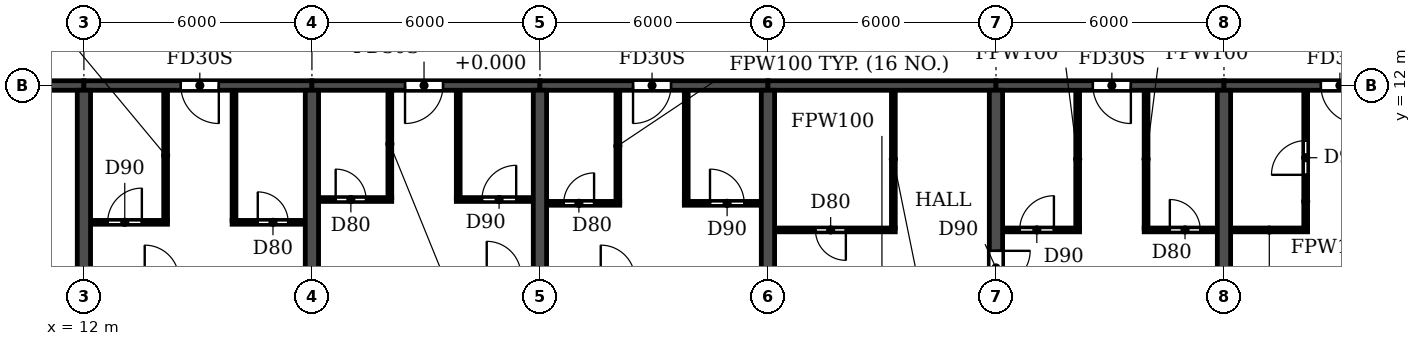
"""IFC4 building model, lengths in metres.
Left out: names, types, materials, properties, quantities, classifications, styles, units other than length and angle.
Written with IfcOpenShell. Run it as: python <this file> out.ifc"""

import sys

from ifc_helpers import new_model, si_unit, direction, frame, frame_2d, origin, place, context, subcontext, project, spatial, rectangle, extrude, element, fill, save


model = new_model("IFC4")
c1 = context("Model", 3, precision=1e-05, world=origin(), true_north=direction((0.0, 1.0)))
c2 = subcontext(c1, "Body", "Model", "MODEL_VIEW")
j1 = project(units=[si_unit("LENGTHUNIT", "METRE"), si_unit("PLANEANGLEUNIT", "RADIAN")], contexts=[c1])
p1 = place(None, origin())
s1 = spatial("IfcSite", under=j1, at=p1, CompositionType="ELEMENT")
p2 = place(p1, origin())
s2 = spatial("IfcBuilding", under=s1, at=p2, CompositionType="ELEMENT")
p3 = place(p2, frame((0.0, 0.0, 76.2)))
s3 = spatial("IfcBuildingStorey", under=s2, at=p3, CompositionType="ELEMENT", Elevation=76.2)
for number, where, z_axis, x_axis in (
    (1, (12.0, 0.2, 0.0), (0.0, 0.0, 1.0), (0.0, 1.0, 0.0)),
    (2, (18.0, 0.2, 0.0), (0.0, 0.0, 1.0), (0.0, 1.0, 0.0)),
    (3, (24.0, 0.2, 0.0), (0.0, 0.0, 1.0), (0.0, 1.0, 0.0)),
    (4, (30.0, 0.2, 0.0), (0.0, 0.0, 1.0), (0.0, 1.0, 0.0)),
):
    element("IfcWall", number, at=place(p3, frame(where, z_axis=z_axis, x_axis=x_axis)), inside=s3, PredefinedType="SHEAR", context=c2, shape_type="SweptSolid", body=[
        extrude(rectangle(XDim=11.675, YDim=0.35, at=frame_2d((5.837, 0.0))), origin(), (0.0, 0.0, 1.0), 3.06),
    ])
p4 = place(p3, frame((36.0, 0.2, 0.0), z_axis=(0.0, 0.0, 1.0), x_axis=(0.0, 1.0, 0.0)))
e5 = element("IfcWall", 5, at=p4, inside=s3, PredefinedType="SHEAR", context=c2, shape_type="SweptSolid", body=[
    extrude(rectangle(XDim=11.675, YDim=0.35, at=frame_2d((5.837, 0.0))), origin(), (0.0, 0.0, 1.0), 3.06),
])
p5 = place(p4, frame((6.55, 0.0, 0.0)))
e6 = element("IfcOpeningElement", 6, at=p5, cuts=e5, PredefinedType="OPENING", context=c2, shape_type="SweptSolid", body=[
    extrude(rectangle(XDim=0.9, YDim=2.1, at=frame_2d((0.45, 1.05))), frame((0.0, 0.185, 0.0), z_axis=(0.0, -1.0, 0.0), x_axis=(1.0, 0.0, 0.0)), (0.0, 0.0, 1.0), 0.37),
])
p6 = place(p3, frame((42.0, 0.2, 0.0), z_axis=(0.0, 0.0, 1.0), x_axis=(0.0, 1.0, 0.0)))
e7 = element("IfcWall", 7, at=p6, inside=s3, PredefinedType="SHEAR", context=c2, shape_type="SweptSolid", body=[
    extrude(rectangle(XDim=11.675, YDim=0.35, at=frame_2d((5.837, 0.0))), origin(), (0.0, 0.0, 1.0), 3.06),
])
p7 = place(p3, frame((6.2, 12.0, 0.0), z_axis=(0.0, 0.0, 1.0), x_axis=(1.0, 0.0, 0.0)))
e8 = element("IfcWall", 8, at=p7, inside=s3, PredefinedType="SHEAR", context=c2, shape_type="SweptSolid", body=[
    extrude(rectangle(XDim=5.8, YDim=0.25, at=frame_2d((2.9, 0.0))), origin(), (0.0, 0.0, 1.0), 2.46),
])
p8 = place(p7, frame((2.3, 0.0, 0.0)))
e9 = element("IfcOpeningElement", 9, at=p8, cuts=e8, PredefinedType="OPENING", context=c2, shape_type="SweptSolid", body=[
    extrude(rectangle(XDim=1.0, YDim=2.1, at=frame_2d((0.5, 1.05))), frame((0.0, 0.135, 0.0), z_axis=(0.0, -1.0, 0.0), x_axis=(1.0, 0.0, 0.0)), (0.0, 0.0, 1.0), 0.27),
])
p9 = place(p3, frame((12.0, 12.0, 0.0), z_axis=(0.0, 0.0, 1.0), x_axis=(1.0, 0.0, 0.0)))
e10 = element("IfcWall", 10, at=p9, inside=s3, PredefinedType="SHEAR", context=c2, shape_type="SweptSolid", body=[
    extrude(rectangle(XDim=6.0, YDim=0.25, at=frame_2d((3.0, 0.0))), origin(), (0.0, 0.0, 1.0), 2.46),
])
p10 = place(p9, frame((2.55, 0.0, 0.0)))
e11 = element("IfcOpeningElement", 11, at=p10, cuts=e10, PredefinedType="OPENING", context=c2, shape_type="SweptSolid", body=[
    extrude(rectangle(XDim=1.0, YDim=2.1, at=frame_2d((0.5, 1.05))), frame((0.0, 0.135, 0.0), z_axis=(0.0, -1.0, 0.0), x_axis=(1.0, 0.0, 0.0)), (0.0, 0.0, 1.0), 0.27),
])
p11 = place(p3, frame((18.0, 12.0, 0.0), z_axis=(0.0, 0.0, 1.0), x_axis=(1.0, 0.0, 0.0)))
e12 = element("IfcWall", 12, at=p11, inside=s3, PredefinedType="SHEAR", context=c2, shape_type="SweptSolid", body=[
    extrude(rectangle(XDim=6.0, YDim=0.25, at=frame_2d((3.0, 0.0))), origin(), (0.0, 0.0, 1.0), 2.46),
])
p12 = place(p11, frame((2.45, 0.0, 0.0)))
e13 = element("IfcOpeningElement", 13, at=p12, cuts=e12, PredefinedType="OPENING", context=c2, shape_type="SweptSolid", body=[
    extrude(rectangle(XDim=1.0, YDim=2.1, at=frame_2d((0.5, 1.05))), frame((0.0, 0.135, 0.0), z_axis=(0.0, -1.0, 0.0), x_axis=(1.0, 0.0, 0.0)), (0.0, 0.0, 1.0), 0.27),
])
p13 = place(p3, frame((24.0, 12.0, 0.0), z_axis=(0.0, 0.0, 1.0), x_axis=(1.0, 0.0, 0.0)))
e14 = element("IfcWall", 14, at=p13, inside=s3, PredefinedType="SHEAR", context=c2, shape_type="SweptSolid", body=[
    extrude(rectangle(XDim=6.0, YDim=0.25, at=frame_2d((3.0, 0.0))), origin(), (0.0, 0.0, 1.0), 2.46),
])
p14 = place(p13, frame((2.45, 0.0, 0.0)))
e15 = element("IfcOpeningElement", 15, at=p14, cuts=e14, PredefinedType="OPENING", context=c2, shape_type="SweptSolid", body=[
    extrude(rectangle(XDim=1.0, YDim=2.1, at=frame_2d((0.5, 1.05))), frame((0.0, 0.135, 0.0), z_axis=(0.0, -1.0, 0.0), x_axis=(1.0, 0.0, 0.0)), (0.0, 0.0, 1.0), 0.27),
])
p15 = place(p3, frame((30.0, 12.0, 0.0), z_axis=(0.0, 0.0, 1.0), x_axis=(1.0, 0.0, 0.0)))
e16 = element("IfcWall", 16, at=p15, inside=s3, PredefinedType="SHEAR", context=c2, shape_type="SweptSolid", body=[
    extrude(rectangle(XDim=6.0, YDim=0.25, at=frame_2d((3.0, 0.0))), origin(), (0.0, 0.0, 1.0), 2.46),
])
p16 = place(p3, frame((36.0, 12.0, 0.0), z_axis=(0.0, 0.0, 1.0), x_axis=(1.0, 0.0, 0.0)))
e17 = element("IfcWall", 17, at=p16, inside=s3, PredefinedType="SHEAR", context=c2, shape_type="SweptSolid", body=[
    extrude(rectangle(XDim=6.0, YDim=0.25, at=frame_2d((3.0, 0.0))), origin(), (0.0, 0.0, 1.0), 2.46),
])
p17 = place(p16, frame((2.55, 0.0, 0.0)))
e18 = element("IfcOpeningElement", 18, at=p17, cuts=e17, PredefinedType="OPENING", context=c2, shape_type="SweptSolid", body=[
    extrude(rectangle(XDim=1.0, YDim=2.1, at=frame_2d((0.5, 1.05))), frame((0.0, 0.135, 0.0), z_axis=(0.0, -1.0, 0.0), x_axis=(1.0, 0.0, 0.0)), (0.0, 0.0, 1.0), 0.27),
])
p18 = place(p3, frame((42.0, 12.0, 0.0), z_axis=(0.0, 0.0, 1.0), x_axis=(1.0, 0.0, 0.0)))
e19 = element("IfcWall", 19, at=p18, inside=s3, PredefinedType="SHEAR", context=c2, shape_type="SweptSolid", body=[
    extrude(rectangle(XDim=6.0, YDim=0.25, at=frame_2d((3.0, 0.0))), origin(), (0.0, 0.0, 1.0), 2.46),
])
p19 = place(p18, frame((2.55, 0.0, 0.0)))
e20 = element("IfcOpeningElement", 20, at=p19, cuts=e19, PredefinedType="OPENING", context=c2, shape_type="SweptSolid", body=[
    extrude(rectangle(XDim=1.0, YDim=2.1, at=frame_2d((0.5, 1.05))), frame((0.0, 0.135, 0.0), z_axis=(0.0, -1.0, 0.0), x_axis=(1.0, 0.0, 0.0)), (0.0, 0.0, 1.0), 0.27),
])
p20 = place(p3, frame((30.185, 8.2, 0.0), z_axis=(0.0, 0.0, 1.0), x_axis=(1.0, 0.0, 0.0)))
e21 = element("IfcWall", 21, at=p20, inside=s3, PredefinedType="PARTITIONING", context=c2, shape_type="SweptSolid", body=[
    extrude(rectangle(XDim=3.165, YDim=0.1, at=frame_2d((1.583, 0.0))), origin(), (0.0, 0.0, 1.0), 3.06),
])
p21 = place(p20, frame((1.065, 0.0, 0.0)))
e22 = element("IfcOpeningElement", 22, at=p21, cuts=e21, PredefinedType="OPENING", context=c2, shape_type="SweptSolid", body=[
    extrude(rectangle(XDim=0.8, YDim=2.1, at=frame_2d((0.4, 1.05))), frame((0.0, 0.06, 0.0), z_axis=(0.0, -1.0, 0.0), x_axis=(1.0, 0.0, 0.0)), (0.0, 0.0, 1.0), 0.12),
])
p22 = place(p3, frame((36.185, 8.2, 0.0), z_axis=(0.0, 0.0, 1.0), x_axis=(1.0, 0.0, 0.0)))
e23 = element("IfcWall", 23, at=p22, inside=s3, PredefinedType="PARTITIONING", context=c2, shape_type="SweptSolid", body=[
    extrude(rectangle(XDim=2.015, YDim=0.1, at=frame_2d((1.007, 0.0))), origin(), (0.0, 0.0, 1.0), 3.06),
])
p23 = place(p22, frame((0.44, 0.0, 0.0)))
e24 = element("IfcOpeningElement", 24, at=p23, cuts=e23, PredefinedType="OPENING", context=c2, shape_type="SweptSolid", body=[
    extrude(rectangle(XDim=0.9, YDim=2.1, at=frame_2d((0.45, 1.05))), frame((0.0, 0.06, 0.0), z_axis=(0.0, -1.0, 0.0), x_axis=(1.0, 0.0, 0.0)), (0.0, 0.0, 1.0), 0.12),
])
p24 = place(p3, frame((39.9, 8.2, 0.0), z_axis=(0.0, 0.0, 1.0), x_axis=(1.0, 0.0, 0.0)))
e25 = element("IfcWall", 25, at=p24, inside=s3, PredefinedType="PARTITIONING", context=c2, shape_type="SweptSolid", body=[
    extrude(rectangle(XDim=1.915, YDim=0.1, at=frame_2d((0.958, 0.0))), origin(), (0.0, 0.0, 1.0), 3.06),
])
p25 = place(p24, frame((0.675, 0.0, 0.0)))
e26 = element("IfcOpeningElement", 26, at=p25, cuts=e25, PredefinedType="OPENING", context=c2, shape_type="SweptSolid", body=[
    extrude(rectangle(XDim=0.8, YDim=2.1, at=frame_2d((0.4, 1.05))), frame((0.0, 0.06, 0.0), z_axis=(0.0, -1.0, 0.0), x_axis=(1.0, 0.0, 0.0)), (0.0, 0.0, 1.0), 0.12),
])
p26 = place(p3, frame((42.185, 8.2, 0.0), z_axis=(0.0, 0.0, 1.0), x_axis=(1.0, 0.0, 0.0)))
e27 = element("IfcWall", 27, at=p26, inside=s3, PredefinedType="PARTITIONING", context=c2, shape_type="SweptSolid", body=[
    extrude(rectangle(XDim=2.015, YDim=0.1, at=frame_2d((1.007, 0.0))), origin(), (0.0, 0.0, 1.0), 3.06),
])
p27 = place(p3, frame((12.185, 8.4, 0.0), z_axis=(0.0, 0.0, 1.0), x_axis=(1.0, 0.0, 0.0)))
e28 = element("IfcWall", 28, at=p27, inside=s3, PredefinedType="PARTITIONING", context=c2, shape_type="SweptSolid", body=[
    extrude(rectangle(XDim=2.015, YDim=0.1, at=frame_2d((1.007, 0.0))), origin(), (0.0, 0.0, 1.0), 3.06),
])
p28 = place(p27, frame((0.44, 0.0, 0.0)))
e29 = element("IfcOpeningElement", 29, at=p28, cuts=e28, PredefinedType="OPENING", context=c2, shape_type="SweptSolid", body=[
    extrude(rectangle(XDim=0.9, YDim=2.1, at=frame_2d((0.45, 1.05))), frame((0.0, 0.06, 0.0), z_axis=(0.0, -1.0, 0.0), x_axis=(1.0, 0.0, 0.0)), (0.0, 0.0, 1.0), 0.12),
])
p29 = place(p3, frame((15.9, 8.4, 0.0), z_axis=(0.0, 0.0, 1.0), x_axis=(1.0, 0.0, 0.0)))
e30 = element("IfcWall", 30, at=p29, inside=s3, PredefinedType="PARTITIONING", context=c2, shape_type="SweptSolid", body=[
    extrude(rectangle(XDim=1.915, YDim=0.1, at=frame_2d((0.958, 0.0))), origin(), (0.0, 0.0, 1.0), 3.06),
])
p30 = place(p29, frame((0.675, 0.0, 0.0)))
e31 = element("IfcOpeningElement", 31, at=p30, cuts=e30, PredefinedType="OPENING", context=c2, shape_type="SweptSolid", body=[
    extrude(rectangle(XDim=0.8, YDim=2.1, at=frame_2d((0.4, 1.05))), frame((0.0, 0.06, 0.0), z_axis=(0.0, -1.0, 0.0), x_axis=(1.0, 0.0, 0.0)), (0.0, 0.0, 1.0), 0.12),
])
p31 = place(p3, frame((24.185, 8.9, 0.0), z_axis=(0.0, 0.0, 1.0), x_axis=(1.0, 0.0, 0.0)))
e32 = element("IfcWall", 32, at=p31, inside=s3, PredefinedType="PARTITIONING", context=c2, shape_type="SweptSolid", body=[
    extrude(rectangle(XDim=1.915, YDim=0.1, at=frame_2d((0.958, 0.0))), origin(), (0.0, 0.0, 1.0), 3.06),
])
p32 = place(p31, frame((0.44, 0.0, 0.0)))
e33 = element("IfcOpeningElement", 33, at=p32, cuts=e32, PredefinedType="OPENING", context=c2, shape_type="SweptSolid", body=[
    extrude(rectangle(XDim=0.8, YDim=2.1, at=frame_2d((0.4, 1.05))), frame((0.0, 0.06, 0.0), z_axis=(0.0, -1.0, 0.0), x_axis=(1.0, 0.0, 0.0)), (0.0, 0.0, 1.0), 0.12),
])
p33 = place(p3, frame((27.8, 8.9, 0.0), z_axis=(0.0, 0.0, 1.0), x_axis=(1.0, 0.0, 0.0)))
e34 = element("IfcWall", 34, at=p33, inside=s3, PredefinedType="PARTITIONING", context=c2, shape_type="SweptSolid", body=[
    extrude(rectangle(XDim=2.015, YDim=0.1, at=frame_2d((1.007, 0.0))), origin(), (0.0, 0.0, 1.0), 3.06),
])
p34 = place(p33, frame((0.675, 0.0, 0.0)))
e35 = element("IfcOpeningElement", 35, at=p34, cuts=e34, PredefinedType="OPENING", context=c2, shape_type="SweptSolid", body=[
    extrude(rectangle(XDim=0.9, YDim=2.1, at=frame_2d((0.45, 1.05))), frame((0.0, 0.06, 0.0), z_axis=(0.0, -1.0, 0.0), x_axis=(1.0, 0.0, 0.0)), (0.0, 0.0, 1.0), 0.12),
])
p35 = place(p3, frame((18.185, 9.0, 0.0), z_axis=(0.0, 0.0, 1.0), x_axis=(1.0, 0.0, 0.0)))
e36 = element("IfcWall", 36, at=p35, inside=s3, PredefinedType="PARTITIONING", context=c2, shape_type="SweptSolid", body=[
    extrude(rectangle(XDim=1.915, YDim=0.1, at=frame_2d((0.958, 0.0))), origin(), (0.0, 0.0, 1.0), 3.06),
])
p36 = place(p35, frame((0.44, 0.0, 0.0)))
e37 = element("IfcOpeningElement", 37, at=p36, cuts=e36, PredefinedType="OPENING", context=c2, shape_type="SweptSolid", body=[
    extrude(rectangle(XDim=0.8, YDim=2.1, at=frame_2d((0.4, 1.05))), frame((0.0, 0.06, 0.0), z_axis=(0.0, -1.0, 0.0), x_axis=(1.0, 0.0, 0.0)), (0.0, 0.0, 1.0), 0.12),
])
p37 = place(p3, frame((21.8, 9.0, 0.0), z_axis=(0.0, 0.0, 1.0), x_axis=(1.0, 0.0, 0.0)))
e38 = element("IfcWall", 38, at=p37, inside=s3, PredefinedType="PARTITIONING", context=c2, shape_type="SweptSolid", body=[
    extrude(rectangle(XDim=2.015, YDim=0.1, at=frame_2d((1.007, 0.0))), origin(), (0.0, 0.0, 1.0), 3.06),
])
p38 = place(p37, frame((0.675, 0.0, 0.0)))
e39 = element("IfcOpeningElement", 39, at=p38, cuts=e38, PredefinedType="OPENING", context=c2, shape_type="SweptSolid", body=[
    extrude(rectangle(XDim=0.9, YDim=2.1, at=frame_2d((0.45, 1.05))), frame((0.0, 0.06, 0.0), z_axis=(0.0, -1.0, 0.0), x_axis=(1.0, 0.0, 0.0)), (0.0, 0.0, 1.0), 0.12),
])
for number, where, z_axis, x_axis in (
    (40, (14.15, 8.45, 0.0), (0.0, 0.0, 1.0), (0.0, 1.0, 0.0)),
    (41, (15.95, 8.45, 0.0), (0.0, 0.0, 1.0), (0.0, 1.0, 0.0)),
):
    element("IfcWall", number, at=place(p3, frame(where, z_axis=z_axis, x_axis=x_axis)), inside=s3, PredefinedType="PARTITIONING", context=c2, shape_type="SweptSolid", body=[
        extrude(rectangle(XDim=3.415, YDim=0.1, at=frame_2d((1.708, 0.0))), origin(), (0.0, 0.0, 1.0), 3.06),
    ])
for number, where, z_axis, x_axis in (
    (42, (20.05, 9.05, 0.0), (0.0, 0.0, 1.0), (0.0, 1.0, 0.0)),
    (43, (21.85, 9.05, 0.0), (0.0, 0.0, 1.0), (0.0, 1.0, 0.0)),
):
    element("IfcWall", number, at=place(p3, frame(where, z_axis=z_axis, x_axis=x_axis)), inside=s3, PredefinedType="PARTITIONING", context=c2, shape_type="SweptSolid", body=[
        extrude(rectangle(XDim=2.815, YDim=0.1, at=frame_2d((1.407, 0.0))), origin(), (0.0, 0.0, 1.0), 3.06),
    ])
for number, where, z_axis, x_axis in (
    (44, (26.05, 8.95, 0.0), (0.0, 0.0, 1.0), (0.0, 1.0, 0.0)),
    (45, (27.85, 8.95, 0.0), (0.0, 0.0, 1.0), (0.0, 1.0, 0.0)),
):
    element("IfcWall", number, at=place(p3, frame(where, z_axis=z_axis, x_axis=x_axis)), inside=s3, PredefinedType="PARTITIONING", context=c2, shape_type="SweptSolid", body=[
        extrude(rectangle(XDim=2.915, YDim=0.1, at=frame_2d((1.458, 0.0))), origin(), (0.0, 0.0, 1.0), 3.06),
    ])
for number, where, z_axis, x_axis in (
    (46, (33.3, 8.25, 0.0), (0.0, 0.0, 1.0), (0.0, 1.0, 0.0)),
    (47, (38.15, 8.25, 0.0), (0.0, 0.0, 1.0), (0.0, 1.0, 0.0)),
    (48, (39.95, 8.25, 0.0), (0.0, 0.0, 1.0), (0.0, 1.0, 0.0)),
):
    element("IfcWall", number, at=place(p3, frame(where, z_axis=z_axis, x_axis=x_axis)), inside=s3, PredefinedType="PARTITIONING", context=c2, shape_type="SweptSolid", body=[
        extrude(rectangle(XDim=3.615, YDim=0.1, at=frame_2d((1.808, 0.0))), origin(), (0.0, 0.0, 1.0), 3.06),
    ])
p39 = place(p3, frame((44.15, 8.25, 0.0), z_axis=(0.0, 0.0, 1.0), x_axis=(0.0, 1.0, 0.0)))
e49 = element("IfcWall", 49, at=p39, inside=s3, PredefinedType="PARTITIONING", context=c2, shape_type="SweptSolid", body=[
    extrude(rectangle(XDim=3.615, YDim=0.1, at=frame_2d((1.808, 0.0))), origin(), (0.0, 0.0, 1.0), 3.06),
])
p40 = place(p39, frame((1.4, 0.0, 0.0)))
e50 = element("IfcOpeningElement", 50, at=p40, cuts=e49, PredefinedType="OPENING", context=c2, shape_type="SweptSolid", body=[
    extrude(rectangle(XDim=0.9, YDim=2.1, at=frame_2d((0.45, 1.05))), frame((0.0, 0.06, 0.0), z_axis=(0.0, -1.0, 0.0), x_axis=(1.0, 0.0, 0.0)), (0.0, 0.0, 1.0), 0.12),
])
p41 = place(p28, origin())
e51 = element("IfcDoor", 51, at=p41, inside=s3, OperationType="SINGLE_SWING_RIGHT", PredefinedType="DOOR", context=c2, shape_type="SweptSolid", body=[
    extrude(rectangle(XDim=0.9, YDim=2.1, at=frame_2d((0.45, 1.05))), frame((0.0, 0.025, 0.0), z_axis=(0.0, -1.0, 0.0), x_axis=(1.0, 0.0, 0.0)), (0.0, 0.0, 1.0), 0.05),
])
fill(e29, e51)
p42 = place(p10, frame((1.0, 0.0, 0.0), z_axis=(0.0, 0.0, 1.0), x_axis=(-1.0, 0.0, 0.0)))
e52 = element("IfcDoor", 52, at=p42, inside=s3, OperationType="SINGLE_SWING_LEFT", PredefinedType="DOOR", context=c2, shape_type="SweptSolid", body=[
    extrude(rectangle(XDim=1.0, YDim=2.1, at=frame_2d((0.5, 1.05))), frame((0.0, 0.025, 0.0), z_axis=(0.0, -1.0, 0.0), x_axis=(1.0, 0.0, 0.0)), (0.0, 0.0, 1.0), 0.05),
])
fill(e11, e52)
p43 = place(p30, origin())
e53 = element("IfcDoor", 53, at=p43, inside=s3, OperationType="SINGLE_SWING_LEFT", PredefinedType="DOOR", context=c2, shape_type="SweptSolid", body=[
    extrude(rectangle(XDim=0.8, YDim=2.1, at=frame_2d((0.4, 1.05))), frame((0.0, 0.025, 0.0), z_axis=(0.0, -1.0, 0.0), x_axis=(1.0, 0.0, 0.0)), (0.0, 0.0, 1.0), 0.05),
])
fill(e31, e53)
p44 = place(p36, origin())
e54 = element("IfcDoor", 54, at=p44, inside=s3, OperationType="SINGLE_SWING_LEFT", PredefinedType="DOOR", context=c2, shape_type="SweptSolid", body=[
    extrude(rectangle(XDim=0.8, YDim=2.1, at=frame_2d((0.4, 1.05))), frame((0.0, 0.025, 0.0), z_axis=(0.0, -1.0, 0.0), x_axis=(1.0, 0.0, 0.0)), (0.0, 0.0, 1.0), 0.05),
])
fill(e37, e54)
p45 = place(p12, frame((1.0, 0.0, 0.0), z_axis=(0.0, 0.0, 1.0), x_axis=(-1.0, 0.0, 0.0)))
e55 = element("IfcDoor", 55, at=p45, inside=s3, OperationType="SINGLE_SWING_RIGHT", PredefinedType="DOOR", context=c2, shape_type="SweptSolid", body=[
    extrude(rectangle(XDim=1.0, YDim=2.1, at=frame_2d((0.5, 1.05))), frame((0.0, 0.025, 0.0), z_axis=(0.0, -1.0, 0.0), x_axis=(1.0, 0.0, 0.0)), (0.0, 0.0, 1.0), 0.05),
])
fill(e13, e55)
p46 = place(p38, origin())
e56 = element("IfcDoor", 56, at=p46, inside=s3, OperationType="SINGLE_SWING_RIGHT", PredefinedType="DOOR", context=c2, shape_type="SweptSolid", body=[
    extrude(rectangle(XDim=0.9, YDim=2.1, at=frame_2d((0.45, 1.05))), frame((0.0, 0.025, 0.0), z_axis=(0.0, -1.0, 0.0), x_axis=(1.0, 0.0, 0.0)), (0.0, 0.0, 1.0), 0.05),
])
fill(e39, e56)
p47 = place(p32, origin())
e57 = element("IfcDoor", 57, at=p47, inside=s3, OperationType="SINGLE_SWING_RIGHT", PredefinedType="DOOR", context=c2, shape_type="SweptSolid", body=[
    extrude(rectangle(XDim=0.8, YDim=2.1, at=frame_2d((0.4, 1.05))), frame((0.0, 0.025, 0.0), z_axis=(0.0, -1.0, 0.0), x_axis=(1.0, 0.0, 0.0)), (0.0, 0.0, 1.0), 0.05),
])
fill(e33, e57)
p48 = place(p14, frame((1.0, 0.0, 0.0), z_axis=(0.0, 0.0, 1.0), x_axis=(-1.0, 0.0, 0.0)))
e58 = element("IfcDoor", 58, at=p48, inside=s3, OperationType="SINGLE_SWING_RIGHT", PredefinedType="DOOR", context=c2, shape_type="SweptSolid", body=[
    extrude(rectangle(XDim=1.0, YDim=2.1, at=frame_2d((0.5, 1.05))), frame((0.0, 0.025, 0.0), z_axis=(0.0, -1.0, 0.0), x_axis=(1.0, 0.0, 0.0)), (0.0, 0.0, 1.0), 0.05),
])
fill(e15, e58)
p49 = place(p34, origin())
e59 = element("IfcDoor", 59, at=p49, inside=s3, OperationType="SINGLE_SWING_LEFT", PredefinedType="DOOR", context=c2, shape_type="SweptSolid", body=[
    extrude(rectangle(XDim=0.9, YDim=2.1, at=frame_2d((0.45, 1.05))), frame((0.0, 0.025, 0.0), z_axis=(0.0, -1.0, 0.0), x_axis=(1.0, 0.0, 0.0)), (0.0, 0.0, 1.0), 0.05),
])
fill(e35, e59)
p50 = place(p21, frame((0.8, 0.0, 0.0), z_axis=(0.0, 0.0, 1.0), x_axis=(-1.0, 0.0, 0.0)))
e60 = element("IfcDoor", 60, at=p50, inside=s3, OperationType="SINGLE_SWING_LEFT", PredefinedType="DOOR", context=c2, shape_type="SweptSolid", body=[
    extrude(rectangle(XDim=0.8, YDim=2.1, at=frame_2d((0.4, 1.05))), frame((0.0, 0.025, 0.0), z_axis=(0.0, -1.0, 0.0), x_axis=(1.0, 0.0, 0.0)), (0.0, 0.0, 1.0), 0.05),
])
fill(e22, e60)
p51 = place(p5, frame((0.9, 0.0, 0.0), z_axis=(0.0, 0.0, 1.0), x_axis=(-1.0, 0.0, 0.0)))
e61 = element("IfcDoor", 61, at=p51, inside=s3, OperationType="SINGLE_SWING_LEFT", PredefinedType="DOOR", context=c2, shape_type="SweptSolid", body=[
    extrude(rectangle(XDim=0.9, YDim=2.1, at=frame_2d((0.45, 1.05))), frame((0.0, 0.025, 0.0), z_axis=(0.0, -1.0, 0.0), x_axis=(1.0, 0.0, 0.0)), (0.0, 0.0, 1.0), 0.05),
])
fill(e6, e61)
p52 = place(p23, origin())
e62 = element("IfcDoor", 62, at=p52, inside=s3, OperationType="SINGLE_SWING_RIGHT", PredefinedType="DOOR", context=c2, shape_type="SweptSolid", body=[
    extrude(rectangle(XDim=0.9, YDim=2.1, at=frame_2d((0.45, 1.05))), frame((0.0, 0.025, 0.0), z_axis=(0.0, -1.0, 0.0), x_axis=(1.0, 0.0, 0.0)), (0.0, 0.0, 1.0), 0.05),
])
fill(e24, e62)
p53 = place(p17, frame((1.0, 0.0, 0.0), z_axis=(0.0, 0.0, 1.0), x_axis=(-1.0, 0.0, 0.0)))
e63 = element("IfcDoor", 63, at=p53, inside=s3, OperationType="SINGLE_SWING_LEFT", PredefinedType="DOOR", context=c2, shape_type="SweptSolid", body=[
    extrude(rectangle(XDim=1.0, YDim=2.1, at=frame_2d((0.5, 1.05))), frame((0.0, 0.025, 0.0), z_axis=(0.0, -1.0, 0.0), x_axis=(1.0, 0.0, 0.0)), (0.0, 0.0, 1.0), 0.05),
])
fill(e18, e63)
p54 = place(p25, origin())
e64 = element("IfcDoor", 64, at=p54, inside=s3, OperationType="SINGLE_SWING_LEFT", PredefinedType="DOOR", context=c2, shape_type="SweptSolid", body=[
    extrude(rectangle(XDim=0.8, YDim=2.1, at=frame_2d((0.4, 1.05))), frame((0.0, 0.025, 0.0), z_axis=(0.0, -1.0, 0.0), x_axis=(1.0, 0.0, 0.0)), (0.0, 0.0, 1.0), 0.05),
])
fill(e26, e64)
p55 = place(p40, origin())
e65 = element("IfcDoor", 65, at=p55, inside=s3, OperationType="SINGLE_SWING_LEFT", PredefinedType="DOOR", context=c2, shape_type="SweptSolid", body=[
    extrude(rectangle(XDim=0.9, YDim=2.1, at=frame_2d((0.45, 1.05))), frame((0.0, 0.025, 0.0), z_axis=(0.0, -1.0, 0.0), x_axis=(1.0, 0.0, 0.0)), (0.0, 0.0, 1.0), 0.05),
])
fill(e50, e65)
p56 = place(p19, frame((1.0, 0.0, 0.0), z_axis=(0.0, 0.0, 1.0), x_axis=(-1.0, 0.0, 0.0)))
e66 = element("IfcDoor", 66, at=p56, inside=s3, OperationType="SINGLE_SWING_LEFT", PredefinedType="DOOR", context=c2, shape_type="SweptSolid", body=[
    extrude(rectangle(XDim=1.0, YDim=2.1, at=frame_2d((0.5, 1.05))), frame((0.0, 0.025, 0.0), z_axis=(0.0, -1.0, 0.0), x_axis=(1.0, 0.0, 0.0)), (0.0, 0.0, 1.0), 0.05),
])
fill(e20, e66)
save(model, sys.argv[1])
